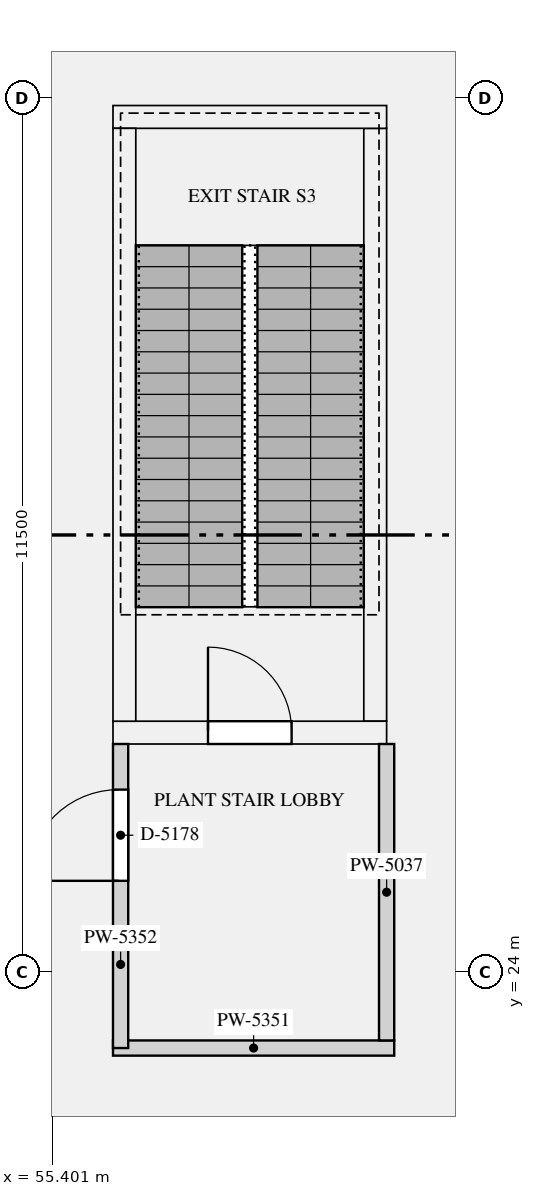
"""IFC4 building model, lengths in metres.
Left out: names, types, materials, properties, quantities, classifications, styles, units other than length and angle.
Written with IfcOpenShell. Run it as: python <this file> out.ifc"""

import sys

from ifc_helpers import new_model, si_unit, direction, frame, frame_2d, origin, place, context, subcontext, project, spatial, rectangle, extrude, element, fill, save


model = new_model("IFC4")
c1 = context("Model", 3, precision=1e-05, world=origin(), true_north=direction((0.0, 1.0)))
c2 = subcontext(c1, "Body", "Model", "MODEL_VIEW")
j1 = project(units=[si_unit("LENGTHUNIT", "METRE"), si_unit("PLANEANGLEUNIT", "RADIAN")], contexts=[c1])
p1 = place(None, origin())
s1 = spatial("IfcSite", under=j1, at=p1, CompositionType="ELEMENT")
p2 = place(p1, origin())
s2 = spatial("IfcBuilding", under=s1, at=p2, CompositionType="ELEMENT")
p3 = place(p2, frame((0.0, 0.0, 185.4)))
s3 = spatial("IfcBuildingStorey", under=s2, at=p3, CompositionType="ELEMENT", Elevation=185.4)
p4 = place(p3, frame((56.2, 27.15, 0.0), z_axis=(0.0, 0.0, 1.0), x_axis=(1.0, 0.0, 0.0)))
e1 = element("IfcWall", 1, at=p4, inside=s3, PredefinedType="SHEAR", context=c2, shape_type="SweptSolid", body=[
    extrude(rectangle(XDim=3.6, YDim=0.3, at=frame_2d((1.8, 0.0))), origin(), (0.0, 0.0, 1.0), 6.3),
])
p5 = place(p4, frame((1.25, 0.0, 0.0)))
e2 = element("IfcOpeningElement", 2, at=p5, cuts=e1, PredefinedType="OPENING", context=c2, shape_type="SweptSolid", body=[
    extrude(rectangle(XDim=1.1, YDim=2.1, at=frame_2d((0.55, 1.05))), frame((0.0, 0.16, 0.0), z_axis=(0.0, -1.0, 0.0), x_axis=(1.0, 0.0, 0.0)), (0.0, 0.0, 1.0), 0.32),
])
p6 = place(p3, frame((56.2, 35.25, 0.0), z_axis=(0.0, 0.0, 1.0), x_axis=(1.0, 0.0, 0.0)))
e3 = element("IfcWall", 3, at=p6, inside=s3, PredefinedType="SHEAR", context=c2, shape_type="SweptSolid", body=[
    extrude(rectangle(XDim=3.6, YDim=0.3, at=frame_2d((1.8, 0.0))), origin(), (0.0, 0.0, 1.0), 6.3),
])
for number, where, z_axis, x_axis in (
    (4, (56.35, 27.3, 0.0), (0.0, 0.0, 1.0), (0.0, 1.0, 0.0)),
    (5, (59.65, 27.3, 0.0), (0.0, 0.0, 1.0), (0.0, 1.0, 0.0)),
):
    element("IfcWall", number, at=place(p3, frame(where, z_axis=z_axis, x_axis=x_axis)), inside=s3, PredefinedType="SHEAR", context=c2, shape_type="SweptSolid", body=[
        extrude(rectangle(XDim=7.8, YDim=0.3, at=frame_2d((3.9, 0.0))), origin(), (0.0, 0.0, 1.0), 6.3),
    ])
p7 = place(p3, frame((56.2, 23.0, 0.0), z_axis=(0.0, 0.0, 1.0), x_axis=(1.0, 0.0, 0.0)))
e6 = element("IfcWall", 6, at=p7, inside=s3, PredefinedType="PARTITIONING", context=c2, shape_type="SweptSolid", body=[
    extrude(rectangle(XDim=3.7, YDim=0.2, at=frame_2d((1.85, 0.0))), origin(), (0.0, 0.0, 1.0), 5.8),
])
p8 = place(p3, frame((56.3, 23.0, 0.0), z_axis=(0.0, 0.0, 1.0), x_axis=(0.0, 1.0, 0.0)))
e7 = element("IfcWall", 7, at=p8, inside=s3, PredefinedType="PARTITIONING", context=c2, shape_type="SweptSolid", body=[
    extrude(rectangle(XDim=4.0, YDim=0.2, at=frame_2d((2.0, 0.0))), origin(), (0.0, 0.0, 1.0), 5.8),
])
p9 = place(p8, frame((2.2, 0.0, 0.0)))
e8 = element("IfcOpeningElement", 8, at=p9, cuts=e7, PredefinedType="OPENING", context=c2, shape_type="SweptSolid", body=[
    extrude(rectangle(XDim=1.2, YDim=2.1, at=frame_2d((0.6, 1.05))), frame((0.0, 0.11, 0.0), z_axis=(0.0, -1.0, 0.0), x_axis=(1.0, 0.0, 0.0)), (0.0, 0.0, 1.0), 0.22),
])
p10 = place(p3, frame((59.8, 23.1, 0.0), z_axis=(0.0, 0.0, 1.0), x_axis=(0.0, 1.0, 0.0)))
e9 = element("IfcWall", 9, at=p10, inside=s3, PredefinedType="PARTITIONING", context=c2, shape_type="SweptSolid", body=[
    extrude(rectangle(XDim=3.9, YDim=0.2, at=frame_2d((1.95, 0.0))), origin(), (0.0, 0.0, 1.0), 5.8),
])
p11 = place(p5, origin())
e10 = element("IfcDoor", 10, at=p11, inside=s3, OperationType="SINGLE_SWING_LEFT", PredefinedType="DOOR", context=c2, shape_type="SweptSolid", body=[
    extrude(rectangle(XDim=1.1, YDim=2.1, at=frame_2d((0.55, 1.05))), frame((0.0, 0.025, 0.0), z_axis=(0.0, -1.0, 0.0), x_axis=(1.0, 0.0, 0.0)), (0.0, 0.0, 1.0), 0.05),
])
fill(e2, e10)
p12 = place(p9, origin())
e11 = element("IfcDoor", 11, at=p12, inside=s3, OperationType="SINGLE_SWING_LEFT", PredefinedType="DOOR", context=c2, shape_type="SweptSolid", body=[
    extrude(rectangle(XDim=1.2, YDim=2.1, at=frame_2d((0.6, 1.05))), frame((0.0, 0.025, 0.0), z_axis=(0.0, -1.0, 0.0), x_axis=(1.0, 0.0, 0.0)), (0.0, 0.0, 1.0), 0.05),
])
fill(e8, e11)
save(model, sys.argv[1])
